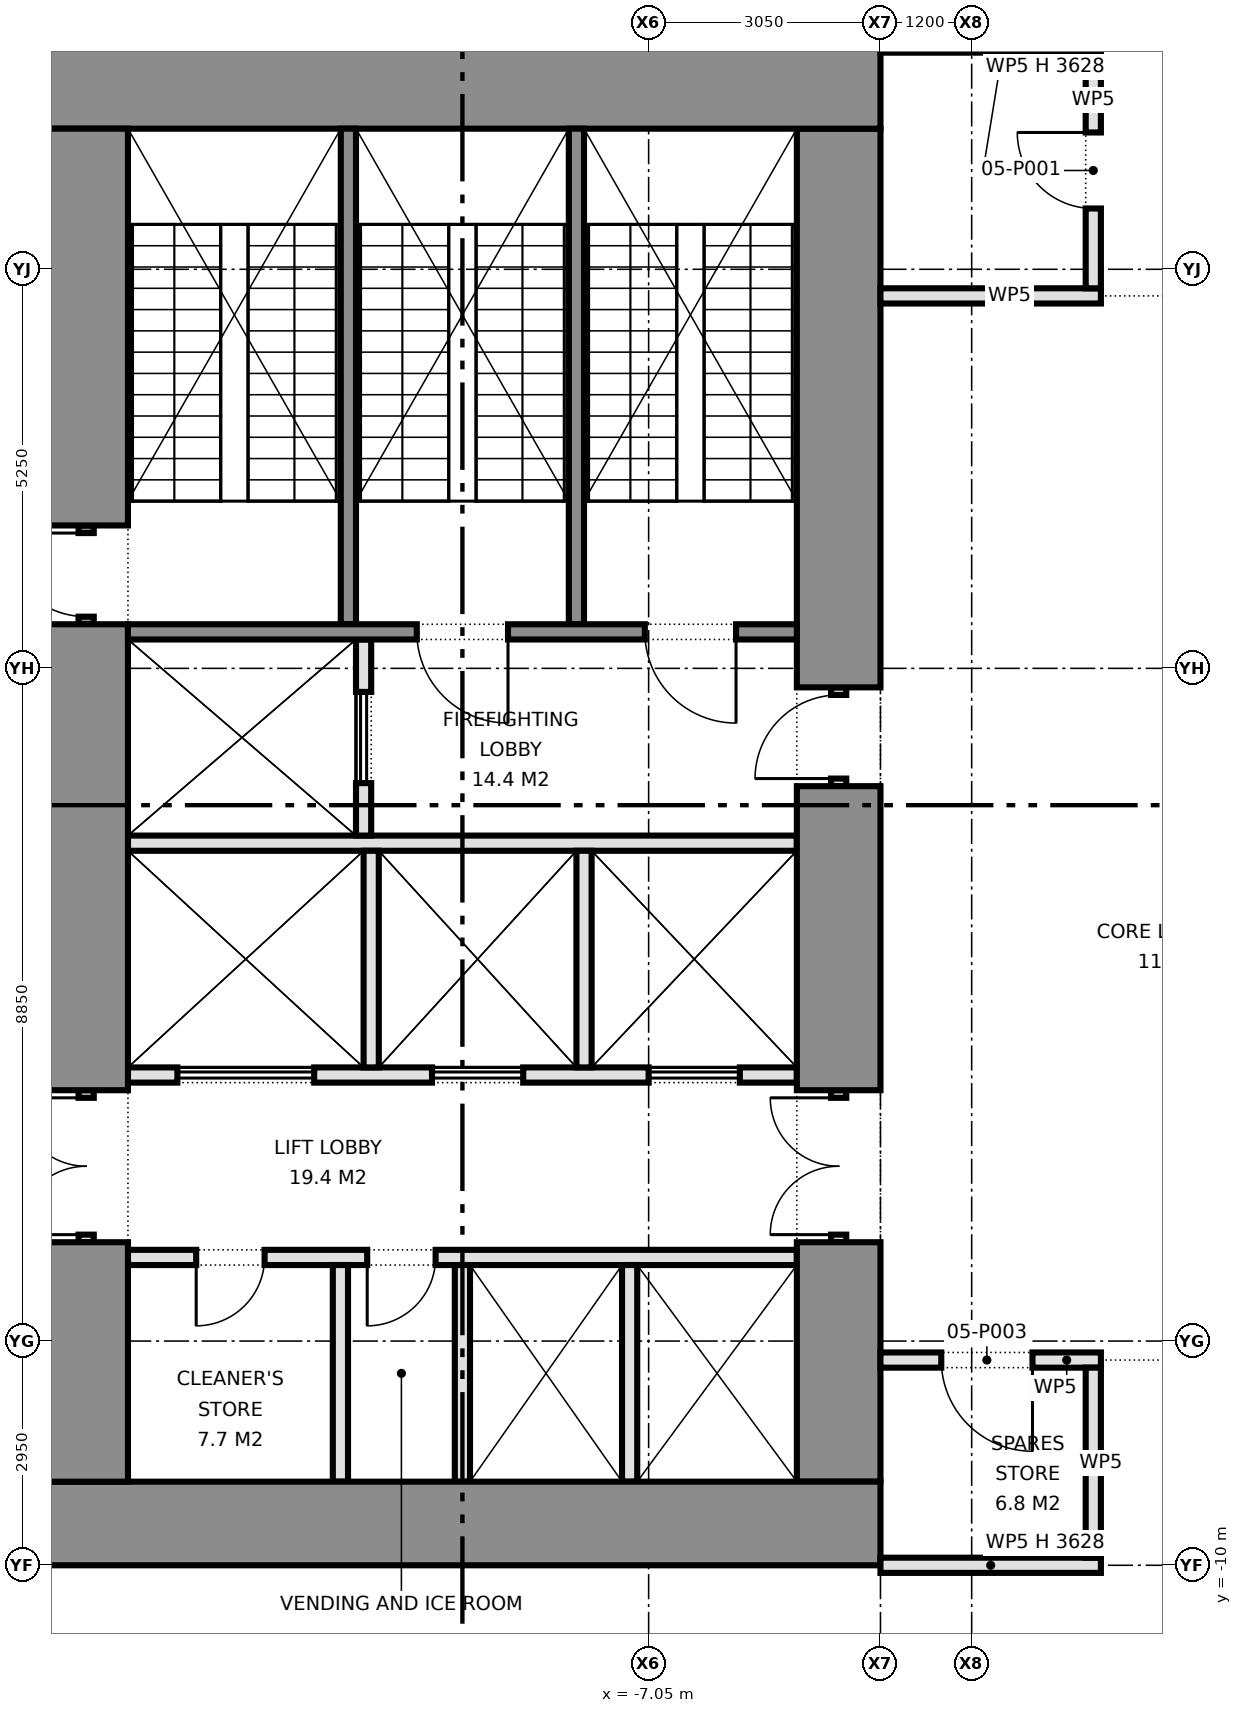
"""IFC4 building model, lengths in metres.
Left out: names, types, materials, properties, quantities, classifications, styles, units other than length and angle.
Written with IfcOpenShell. Run it as: python <this file> out.ifc"""

import sys

from ifc_helpers import new_model, si_unit, direction, frame, frame_2d, origin, place, context, subcontext, project, spatial, rectangle, extrude, element, fill, save


model = new_model("IFC4")
c1 = context("Model", 3, precision=1e-05, world=origin(), true_north=direction((0.0, 1.0)))
c2 = subcontext(c1, "Body", "Model", "MODEL_VIEW")
j1 = project(units=[si_unit("LENGTHUNIT", "METRE"), si_unit("PLANEANGLEUNIT", "RADIAN")], contexts=[c1])
p1 = place(None, origin())
s1 = spatial("IfcSite", under=j1, at=p1, CompositionType="ELEMENT")
p2 = place(p1, origin())
s2 = spatial("IfcBuilding", under=s1, at=p2, CompositionType="ELEMENT")
p3 = place(p2, frame((0.0, 0.0, 20.9)))
s3 = spatial("IfcBuildingStorey", under=s2, at=p3, CompositionType="ELEMENT", Elevation=20.9)
for number, where, z_axis, x_axis in (
    (1, (-15.0, -9.45, 0.0), (0.0, 0.0, 1.0), (1.0, 0.0, 0.0)),
    (2, (-15.0, 9.45, 0.0), (0.0, 0.0, 1.0), (1.0, 0.0, 0.0)),
):
    element("IfcWall", number, at=place(p3, frame(where, z_axis=z_axis, x_axis=x_axis)), inside=s3, PredefinedType="SHEAR", context=c2, shape_type="SweptSolid", body=[
        extrude(rectangle(XDim=11.0, YDim=1.1, at=frame_2d((5.5, 0.0))), origin(), (0.0, 0.0, 1.0), 4.575),
    ])
p4 = place(p3, frame((-14.45, -8.9, 0.0), z_axis=(0.0, 0.0, 1.0), x_axis=(0.0, 1.0, 0.0)))
e3 = element("IfcWall", 3, at=p4, inside=s3, PredefinedType="SHEAR", context=c2, shape_type="SweptSolid", body=[
    extrude(rectangle(XDim=3.15, YDim=1.1, at=frame_2d((1.575, 0.0))), origin(), (0.0, 0.0, 1.0), 4.575),
])
p5 = place(p3, frame((-14.45, -5.75, 0.0), z_axis=(0.0, 0.0, 1.0), x_axis=(0.0, 1.0, 0.0)))
e4 = element("IfcWall", 4, at=p5, inside=s3, PredefinedType="PARTITIONING", context=c2, shape_type="SweptSolid", body=[
    extrude(rectangle(XDim=2.0, YDim=0.2, at=frame_2d((1.0, 0.0))), origin(), (0.0, 0.0, 1.0), 2.4),
])
p6 = place(p5, frame((0.1, 0.0, 0.0)))
e5 = element("IfcOpeningElement", 5, at=p6, cuts=e4, PredefinedType="OPENING", context=c2, shape_type="SweptSolid", body=[
    extrude(rectangle(XDim=1.8, YDim=2.1, at=frame_2d((0.9, 1.05))), frame((0.0, 0.11, 0.0), z_axis=(0.0, -1.0, 0.0), x_axis=(1.0, 0.0, 0.0)), (0.0, 0.0, 1.0), 0.22),
])
p7 = place(p3, frame((-14.45, -3.75, 0.0), z_axis=(0.0, 0.0, 1.0), x_axis=(0.0, 1.0, 0.0)))
e6 = element("IfcWall", 6, at=p7, inside=s3, PredefinedType="SHEAR", context=c2, shape_type="SweptSolid", body=[
    extrude(rectangle(XDim=6.13, YDim=1.1, at=frame_2d((3.065, 0.0))), origin(), (0.0, 0.0, 1.0), 4.575),
])
p8 = place(p3, frame((-14.45, 2.38, 0.0), z_axis=(0.0, 0.0, 1.0), x_axis=(0.0, 1.0, 0.0)))
e7 = element("IfcWall", 7, at=p8, inside=s3, PredefinedType="SHEAR", context=c2, shape_type="SweptSolid", body=[
    extrude(rectangle(XDim=1.3, YDim=0.2, at=frame_2d((0.65, 0.0))), origin(), (0.0, 0.0, 1.0), 2.4),
])
p9 = place(p8, frame((0.1, 0.0, 0.0)))
e8 = element("IfcOpeningElement", 8, at=p9, cuts=e7, PredefinedType="OPENING", context=c2, shape_type="SweptSolid", body=[
    extrude(rectangle(XDim=1.1, YDim=2.1, at=frame_2d((0.55, 1.05))), frame((0.0, 0.11, 0.0), z_axis=(0.0, -1.0, 0.0), x_axis=(1.0, 0.0, 0.0)), (0.0, 0.0, 1.0), 0.22),
])
p10 = place(p3, frame((-14.45, 3.68, 0.0), z_axis=(0.0, 0.0, 1.0), x_axis=(0.0, 1.0, 0.0)))
e9 = element("IfcWall", 9, at=p10, inside=s3, PredefinedType="SHEAR", context=c2, shape_type="SweptSolid", body=[
    extrude(rectangle(XDim=5.22, YDim=1.1, at=frame_2d((2.61, 0.0))), origin(), (0.0, 0.0, 1.0), 4.575),
])
p11 = place(p3, frame((-4.55, -8.9, 0.0), z_axis=(0.0, 0.0, 1.0), x_axis=(0.0, 1.0, 0.0)))
e10 = element("IfcWall", 10, at=p11, inside=s3, PredefinedType="SHEAR", context=c2, shape_type="SweptSolid", body=[
    extrude(rectangle(XDim=3.15, YDim=1.1, at=frame_2d((1.575, 0.0))), origin(), (0.0, 0.0, 1.0), 4.575),
])
p12 = place(p3, frame((-4.55, -5.75, 0.0), z_axis=(0.0, 0.0, 1.0), x_axis=(0.0, 1.0, 0.0)))
e11 = element("IfcWall", 11, at=p12, inside=s3, PredefinedType="PARTITIONING", context=c2, shape_type="SweptSolid", body=[
    extrude(rectangle(XDim=2.0, YDim=0.2, at=frame_2d((1.0, 0.0))), origin(), (0.0, 0.0, 1.0), 2.4),
])
p13 = place(p12, frame((0.1, 0.0, 0.0)))
e12 = element("IfcOpeningElement", 12, at=p13, cuts=e11, PredefinedType="OPENING", context=c2, shape_type="SweptSolid", body=[
    extrude(rectangle(XDim=1.8, YDim=2.1, at=frame_2d((0.9, 1.05))), frame((0.0, 0.11, 0.0), z_axis=(0.0, -1.0, 0.0), x_axis=(1.0, 0.0, 0.0)), (0.0, 0.0, 1.0), 0.22),
])
p14 = place(p3, frame((-4.55, -3.75, 0.0), z_axis=(0.0, 0.0, 1.0), x_axis=(0.0, 1.0, 0.0)))
e13 = element("IfcWall", 13, at=p14, inside=s3, PredefinedType="SHEAR", context=c2, shape_type="SweptSolid", body=[
    extrude(rectangle(XDim=4.0, YDim=1.1, at=frame_2d((2.0, 0.0))), origin(), (0.0, 0.0, 1.0), 4.575),
])
p15 = place(p3, frame((-4.55, 0.25, 0.0), z_axis=(0.0, 0.0, 1.0), x_axis=(0.0, 1.0, 0.0)))
e14 = element("IfcWall", 14, at=p15, inside=s3, PredefinedType="PARTITIONING", context=c2, shape_type="SweptSolid", body=[
    extrude(rectangle(XDim=1.3, YDim=0.2, at=frame_2d((0.65, 0.0))), origin(), (0.0, 0.0, 1.0), 2.4),
])
p16 = place(p15, frame((0.1, 0.0, 0.0)))
e15 = element("IfcOpeningElement", 15, at=p16, cuts=e14, PredefinedType="OPENING", context=c2, shape_type="SweptSolid", body=[
    extrude(rectangle(XDim=1.1, YDim=2.1, at=frame_2d((0.55, 1.05))), frame((0.0, 0.11, 0.0), z_axis=(0.0, -1.0, 0.0), x_axis=(1.0, 0.0, 0.0)), (0.0, 0.0, 1.0), 0.22),
])
p17 = place(p3, frame((-4.55, 1.55, 0.0), z_axis=(0.0, 0.0, 1.0), x_axis=(0.0, 1.0, 0.0)))
e16 = element("IfcWall", 16, at=p17, inside=s3, PredefinedType="SHEAR", context=c2, shape_type="SweptSolid", body=[
    extrude(rectangle(XDim=7.35, YDim=1.1, at=frame_2d((3.675, 0.0))), origin(), (0.0, 0.0, 1.0), 4.575),
])
p18 = place(p3, frame((-13.9, -5.95, 0.0), z_axis=(0.0, 0.0, 1.0), x_axis=(1.0, 0.0, 0.0)))
e17 = element("IfcWall", 17, at=p18, inside=s3, PredefinedType="PARTITIONING", context=c2, shape_type="SweptSolid", body=[
    extrude(rectangle(XDim=8.8, YDim=0.2, at=frame_2d((4.4, 0.0))), origin(), (0.0, 0.0, 1.0), 4.575),
])
p19 = place(p18, frame((0.897, 0.0, 0.0)))
e18 = element("IfcOpeningElement", 18, at=p19, cuts=e17, PredefinedType="OPENING", context=c2, shape_type="SweptSolid", body=[
    extrude(rectangle(XDim=0.9, YDim=2.1, at=frame_2d((0.45, 1.05))), frame((0.0, 0.11, 0.0), z_axis=(0.0, -1.0, 0.0), x_axis=(1.0, 0.0, 0.0)), (0.0, 0.0, 1.0), 0.22),
])
p20 = place(p18, frame((3.147, 0.0, 0.0)))
e19 = element("IfcOpeningElement", 19, at=p20, cuts=e17, PredefinedType="OPENING", context=c2, shape_type="SweptSolid", body=[
    extrude(rectangle(XDim=0.9, YDim=2.1, at=frame_2d((0.45, 1.05))), frame((0.0, 0.11, 0.0), z_axis=(0.0, -1.0, 0.0), x_axis=(1.0, 0.0, 0.0)), (0.0, 0.0, 1.0), 0.22),
])
p21 = place(p3, frame((-13.9, -3.55, 0.0), z_axis=(0.0, 0.0, 1.0), x_axis=(1.0, 0.0, 0.0)))
e20 = element("IfcWall", 20, at=p21, inside=s3, PredefinedType="PARTITIONING", context=c2, shape_type="SweptSolid", body=[
    extrude(rectangle(XDim=8.8, YDim=0.2, at=frame_2d((4.4, 0.0))), origin(), (0.0, 0.0, 1.0), 4.575),
])
p22 = place(p21, frame((0.65, 0.0, 0.0)))
e21 = element("IfcOpeningElement", 21, at=p22, cuts=e20, PredefinedType="OPENING", context=c2, shape_type="SweptSolid", body=[
    extrude(rectangle(XDim=1.8, YDim=2.1, at=frame_2d((0.9, 1.05))), frame((0.0, 0.11, 0.0), z_axis=(0.0, -1.0, 0.0), x_axis=(1.0, 0.0, 0.0)), (0.0, 0.0, 1.0), 0.22),
])
p23 = place(p21, frame((4.0, 0.0, 0.0)))
e22 = element("IfcOpeningElement", 22, at=p23, cuts=e20, PredefinedType="OPENING", context=c2, shape_type="SweptSolid", body=[
    extrude(rectangle(XDim=1.2, YDim=2.1, at=frame_2d((0.6, 1.05))), frame((0.0, 0.11, 0.0), z_axis=(0.0, -1.0, 0.0), x_axis=(1.0, 0.0, 0.0)), (0.0, 0.0, 1.0), 0.22),
])
p24 = place(p21, frame((6.85, 0.0, 0.0)))
e23 = element("IfcOpeningElement", 23, at=p24, cuts=e20, PredefinedType="OPENING", context=c2, shape_type="SweptSolid", body=[
    extrude(rectangle(XDim=1.2, YDim=2.1, at=frame_2d((0.6, 1.05))), frame((0.0, 0.11, 0.0), z_axis=(0.0, -1.0, 0.0), x_axis=(1.0, 0.0, 0.0)), (0.0, 0.0, 1.0), 0.22),
])
p25 = place(p3, frame((-13.9, -0.5, 0.0), z_axis=(0.0, 0.0, 1.0), x_axis=(1.0, 0.0, 0.0)))
e24 = element("IfcWall", 24, at=p25, inside=s3, PredefinedType="PARTITIONING", context=c2, shape_type="SweptSolid", body=[
    extrude(rectangle(XDim=8.8, YDim=0.2, at=frame_2d((4.4, 0.0))), origin(), (0.0, 0.0, 1.0), 4.575),
])
p26 = place(p3, frame((-10.8, -0.4, 0.0), z_axis=(0.0, 0.0, 1.0), x_axis=(0.0, 1.0, 0.0)))
e25 = element("IfcWall", 25, at=p26, inside=s3, PredefinedType="PARTITIONING", context=c2, shape_type="SweptSolid", body=[
    extrude(rectangle(XDim=2.58, YDim=0.2, at=frame_2d((1.29, 0.0))), origin(), (0.0, 0.0, 1.0), 4.575),
])
p27 = place(p26, frame((0.69, 0.0, 0.0)))
e26 = element("IfcOpeningElement", 26, at=p27, cuts=e25, PredefinedType="OPENING", context=c2, shape_type="SweptSolid", body=[
    extrude(rectangle(XDim=1.2, YDim=2.1, at=frame_2d((0.6, 1.05))), frame((0.0, 0.11, 0.0), z_axis=(0.0, -1.0, 0.0), x_axis=(1.0, 0.0, 0.0)), (0.0, 0.0, 1.0), 0.22),
])
p28 = place(p3, frame((-13.9, 2.28, 0.0), z_axis=(0.0, 0.0, 1.0), x_axis=(1.0, 0.0, 0.0)))
e27 = element("IfcWall", 27, at=p28, inside=s3, PredefinedType="SHEAR", context=c2, shape_type="SweptSolid", body=[
    extrude(rectangle(XDim=8.8, YDim=0.2, at=frame_2d((4.4, 0.0))), origin(), (0.0, 0.0, 1.0), 4.575),
])
p29 = place(p28, frame((3.8, 0.0, 0.0)))
e28 = element("IfcOpeningElement", 28, at=p29, cuts=e27, PredefinedType="OPENING", context=c2, shape_type="SweptSolid", body=[
    extrude(rectangle(XDim=1.2, YDim=2.1, at=frame_2d((0.6, 1.05))), frame((0.0, 0.11, 0.0), z_axis=(0.0, -1.0, 0.0), x_axis=(1.0, 0.0, 0.0)), (0.0, 0.0, 1.0), 0.22),
])
p30 = place(p28, frame((6.8, 0.0, 0.0)))
e29 = element("IfcOpeningElement", 29, at=p30, cuts=e27, PredefinedType="OPENING", context=c2, shape_type="SweptSolid", body=[
    extrude(rectangle(XDim=1.2, YDim=2.1, at=frame_2d((0.6, 1.05))), frame((0.0, 0.11, 0.0), z_axis=(0.0, -1.0, 0.0), x_axis=(1.0, 0.0, 0.0)), (0.0, 0.0, 1.0), 0.22),
])
for number, where, z_axis, x_axis in (
    (30, (-11.0, 2.38, 0.0), (0.0, 0.0, 1.0), (0.0, 1.0, 0.0)),
    (31, (-8.0, 2.38, 0.0), (0.0, 0.0, 1.0), (0.0, 1.0, 0.0)),
):
    element("IfcWall", number, at=place(p3, frame(where, z_axis=z_axis, x_axis=x_axis)), inside=s3, PredefinedType="SHEAR", context=c2, shape_type="SweptSolid", body=[
        extrude(rectangle(XDim=6.52, YDim=0.2, at=frame_2d((3.26, 0.0))), origin(), (0.0, 0.0, 1.0), 4.575),
    ])
for number, where, z_axis, x_axis in (
    (32, (-9.5, -8.9, 0.0), (0.0, 0.0, 1.0), (0.0, 1.0, 0.0)),
    (33, (-7.3, -8.9, 0.0), (0.0, 0.0, 1.0), (0.0, 1.0, 0.0)),
    (34, (-11.105, -8.9, 0.0), (0.0, 0.0, 1.0), (0.0, 1.0, 0.0)),
    (35, (-10.7, -3.45, 0.0), (0.0, 0.0, 1.0), (0.0, 1.0, 0.0)),
    (36, (-7.9, -3.45, 0.0), (0.0, 0.0, 1.0), (0.0, 1.0, 0.0)),
):
    element("IfcWall", number, at=place(p3, frame(where, z_axis=z_axis, x_axis=x_axis)), inside=s3, PredefinedType="PARTITIONING", context=c2, shape_type="SweptSolid", body=[
        extrude(rectangle(XDim=2.85, YDim=0.2, at=frame_2d((1.425, 0.0))), origin(), (0.0, 0.0, 1.0), 4.575),
    ])
p31 = place(p3, frame((-4.0, -10.0, 0.0), z_axis=(0.0, 0.0, 1.0), x_axis=(1.0, 0.0, 0.0)))
e37 = element("IfcWall", 37, at=p31, inside=s3, PredefinedType="PARTITIONING", context=c2, shape_type="SweptSolid", body=[
    extrude(rectangle(XDim=2.9, YDim=0.2, at=frame_2d((1.45, 0.0))), origin(), (0.0, 0.0, 1.0), 3.628),
])
p32 = place(p3, frame((-4.0, -7.3, 0.0), z_axis=(0.0, 0.0, 1.0), x_axis=(1.0, 0.0, 0.0)))
e38 = element("IfcWall", 38, at=p32, inside=s3, PredefinedType="PARTITIONING", context=c2, shape_type="SweptSolid", body=[
    extrude(rectangle(XDim=2.9, YDim=0.2, at=frame_2d((1.45, 0.0))), origin(), (0.0, 0.0, 1.0), 4.575),
])
p33 = place(p32, frame((0.8, 0.0, 0.0)))
e39 = element("IfcOpeningElement", 39, at=p33, cuts=e38, PredefinedType="OPENING", context=c2, shape_type="SweptSolid", body=[
    extrude(rectangle(XDim=1.2, YDim=2.1, at=frame_2d((0.6, 1.05))), frame((0.0, 0.11, 0.0), z_axis=(0.0, -1.0, 0.0), x_axis=(1.0, 0.0, 0.0)), (0.0, 0.0, 1.0), 0.22),
])
p34 = place(p3, frame((-4.0, 6.7, 0.0), z_axis=(0.0, 0.0, 1.0), x_axis=(1.0, 0.0, 0.0)))
e40 = element("IfcWall", 40, at=p34, inside=s3, PredefinedType="PARTITIONING", context=c2, shape_type="SweptSolid", body=[
    extrude(rectangle(XDim=2.9, YDim=0.2, at=frame_2d((1.45, 0.0))), origin(), (0.0, 0.0, 1.0), 4.575),
])
p35 = place(p3, frame((-1.2, -9.9, 0.0), z_axis=(0.0, 0.0, 1.0), x_axis=(0.0, 1.0, 0.0)))
e41 = element("IfcWall", 41, at=p35, inside=s3, PredefinedType="PARTITIONING", context=c2, shape_type="SweptSolid", body=[
    extrude(rectangle(XDim=2.5, YDim=0.2, at=frame_2d((1.25, 0.0))), origin(), (0.0, 0.0, 1.0), 4.575),
])
p36 = place(p3, frame((-1.2, 6.8, 0.0), z_axis=(0.0, 0.0, 1.0), x_axis=(0.0, 1.0, 0.0)))
e42 = element("IfcWall", 42, at=p36, inside=s3, PredefinedType="PARTITIONING", context=c2, shape_type="SweptSolid", body=[
    extrude(rectangle(XDim=3.1, YDim=0.2, at=frame_2d((1.55, 0.0))), origin(), (0.0, 0.0, 1.0), 4.575),
])
p37 = place(p36, frame((1.05, 0.0, 0.0)))
e43 = element("IfcOpeningElement", 43, at=p37, cuts=e42, PredefinedType="OPENING", context=c2, shape_type="SweptSolid", body=[
    extrude(rectangle(XDim=1.0, YDim=2.1, at=frame_2d((0.5, 1.05))), frame((0.0, 0.11, 0.0), z_axis=(0.0, -1.0, 0.0), x_axis=(1.0, 0.0, 0.0)), (0.0, 0.0, 1.0), 0.22),
])
p38 = place(p6, origin())
e44 = element("IfcDoor", 44, at=p38, inside=s3, OperationType="DOUBLE_DOOR_SINGLE_SWING", PredefinedType="DOOR", context=c2, shape_type="SweptSolid", body=[
    extrude(rectangle(XDim=1.8, YDim=2.1, at=frame_2d((0.9, 1.05))), frame((0.0, 0.025, 0.0), z_axis=(0.0, -1.0, 0.0), x_axis=(1.0, 0.0, 0.0)), (0.0, 0.0, 1.0), 0.05),
])
fill(e5, e44)
p39 = place(p9, origin())
e45 = element("IfcDoor", 45, at=p39, inside=s3, OperationType="SINGLE_SWING_RIGHT", PredefinedType="DOOR", context=c2, shape_type="SweptSolid", body=[
    extrude(rectangle(XDim=1.1, YDim=2.1, at=frame_2d((0.55, 1.05))), frame((0.0, 0.025, 0.0), z_axis=(0.0, -1.0, 0.0), x_axis=(1.0, 0.0, 0.0)), (0.0, 0.0, 1.0), 0.05),
])
fill(e8, e45)
p40 = place(p13, origin())
e46 = element("IfcDoor", 46, at=p40, inside=s3, OperationType="DOUBLE_DOOR_SINGLE_SWING", PredefinedType="DOOR", context=c2, shape_type="SweptSolid", body=[
    extrude(rectangle(XDim=1.8, YDim=2.1, at=frame_2d((0.9, 1.05))), frame((0.0, 0.025, 0.0), z_axis=(0.0, -1.0, 0.0), x_axis=(1.0, 0.0, 0.0)), (0.0, 0.0, 1.0), 0.05),
])
fill(e12, e46)
p41 = place(p16, origin())
e47 = element("IfcDoor", 47, at=p41, inside=s3, OperationType="SINGLE_SWING_LEFT", PredefinedType="DOOR", context=c2, shape_type="SweptSolid", body=[
    extrude(rectangle(XDim=1.1, YDim=2.1, at=frame_2d((0.55, 1.05))), frame((0.0, 0.025, 0.0), z_axis=(0.0, -1.0, 0.0), x_axis=(1.0, 0.0, 0.0)), (0.0, 0.0, 1.0), 0.05),
])
fill(e15, e47)
p42 = place(p22, origin())
e48 = element("IfcDoor", 48, at=p42, inside=s3, OperationType="DOUBLE_DOOR_SLIDING", PredefinedType="DOOR", context=c2, shape_type="SweptSolid", body=[
    extrude(rectangle(XDim=1.8, YDim=2.1, at=frame_2d((0.9, 1.05))), frame((0.0, 0.025, 0.0), z_axis=(0.0, -1.0, 0.0), x_axis=(1.0, 0.0, 0.0)), (0.0, 0.0, 1.0), 0.05),
])
fill(e21, e48)
p43 = place(p23, origin())
e49 = element("IfcDoor", 49, at=p43, inside=s3, OperationType="DOUBLE_DOOR_SLIDING", PredefinedType="DOOR", context=c2, shape_type="SweptSolid", body=[
    extrude(rectangle(XDim=1.2, YDim=2.1, at=frame_2d((0.6, 1.05))), frame((0.0, 0.025, 0.0), z_axis=(0.0, -1.0, 0.0), x_axis=(1.0, 0.0, 0.0)), (0.0, 0.0, 1.0), 0.05),
])
fill(e22, e49)
p44 = place(p24, origin())
e50 = element("IfcDoor", 50, at=p44, inside=s3, OperationType="DOUBLE_DOOR_SLIDING", PredefinedType="DOOR", context=c2, shape_type="SweptSolid", body=[
    extrude(rectangle(XDim=1.2, YDim=2.1, at=frame_2d((0.6, 1.05))), frame((0.0, 0.025, 0.0), z_axis=(0.0, -1.0, 0.0), x_axis=(1.0, 0.0, 0.0)), (0.0, 0.0, 1.0), 0.05),
])
fill(e23, e50)
p45 = place(p27, origin())
e51 = element("IfcDoor", 51, at=p45, inside=s3, OperationType="DOUBLE_DOOR_SLIDING", PredefinedType="DOOR", context=c2, shape_type="SweptSolid", body=[
    extrude(rectangle(XDim=1.2, YDim=2.1, at=frame_2d((0.6, 1.05))), frame((0.0, 0.025, 0.0), z_axis=(0.0, -1.0, 0.0), x_axis=(1.0, 0.0, 0.0)), (0.0, 0.0, 1.0), 0.05),
])
fill(e26, e51)
p46 = place(p19, frame((0.9, 0.0, 0.0), z_axis=(0.0, 0.0, 1.0), x_axis=(-1.0, 0.0, 0.0)))
e52 = element("IfcDoor", 52, at=p46, inside=s3, OperationType="SINGLE_SWING_RIGHT", PredefinedType="DOOR", context=c2, shape_type="SweptSolid", body=[
    extrude(rectangle(XDim=0.9, YDim=2.1, at=frame_2d((0.45, 1.05))), frame((0.0, 0.025, 0.0), z_axis=(0.0, -1.0, 0.0), x_axis=(1.0, 0.0, 0.0)), (0.0, 0.0, 1.0), 0.05),
])
fill(e18, e52)
p47 = place(p20, frame((0.9, 0.0, 0.0), z_axis=(0.0, 0.0, 1.0), x_axis=(-1.0, 0.0, 0.0)))
e53 = element("IfcDoor", 53, at=p47, inside=s3, OperationType="SINGLE_SWING_RIGHT", PredefinedType="DOOR", context=c2, shape_type="SweptSolid", body=[
    extrude(rectangle(XDim=0.9, YDim=2.1, at=frame_2d((0.45, 1.05))), frame((0.0, 0.025, 0.0), z_axis=(0.0, -1.0, 0.0), x_axis=(1.0, 0.0, 0.0)), (0.0, 0.0, 1.0), 0.05),
])
fill(e19, e53)
p48 = place(p29, frame((1.2, 0.0, 0.0), z_axis=(0.0, 0.0, 1.0), x_axis=(-1.0, 0.0, 0.0)))
e54 = element("IfcDoor", 54, at=p48, inside=s3, OperationType="SINGLE_SWING_LEFT", PredefinedType="DOOR", context=c2, shape_type="SweptSolid", body=[
    extrude(rectangle(XDim=1.2, YDim=2.1, at=frame_2d((0.6, 1.05))), frame((0.0, 0.025, 0.0), z_axis=(0.0, -1.0, 0.0), x_axis=(1.0, 0.0, 0.0)), (0.0, 0.0, 1.0), 0.05),
])
fill(e28, e54)
p49 = place(p30, frame((1.2, 0.0, 0.0), z_axis=(0.0, 0.0, 1.0), x_axis=(-1.0, 0.0, 0.0)))
e55 = element("IfcDoor", 55, at=p49, inside=s3, OperationType="SINGLE_SWING_LEFT", PredefinedType="DOOR", context=c2, shape_type="SweptSolid", body=[
    extrude(rectangle(XDim=1.2, YDim=2.1, at=frame_2d((0.6, 1.05))), frame((0.0, 0.025, 0.0), z_axis=(0.0, -1.0, 0.0), x_axis=(1.0, 0.0, 0.0)), (0.0, 0.0, 1.0), 0.05),
])
fill(e29, e55)
p50 = place(p37, origin())
e56 = element("IfcDoor", 56, at=p50, inside=s3, OperationType="SINGLE_SWING_RIGHT", PredefinedType="DOOR", context=c2, shape_type="SweptSolid", body=[
    extrude(rectangle(XDim=1.0, YDim=2.1, at=frame_2d((0.5, 1.05))), frame((0.0, 0.025, 0.0), z_axis=(0.0, -1.0, 0.0), x_axis=(1.0, 0.0, 0.0)), (0.0, 0.0, 1.0), 0.05),
])
fill(e43, e56)
p51 = place(p33, frame((1.2, 0.0, 0.0), z_axis=(0.0, 0.0, 1.0), x_axis=(-1.0, 0.0, 0.0)))
e57 = element("IfcDoor", 57, at=p51, inside=s3, OperationType="SINGLE_SWING_LEFT", PredefinedType="DOOR", context=c2, shape_type="SweptSolid", body=[
    extrude(rectangle(XDim=1.2, YDim=2.1, at=frame_2d((0.6, 1.05))), frame((0.0, 0.025, 0.0), z_axis=(0.0, -1.0, 0.0), x_axis=(1.0, 0.0, 0.0)), (0.0, 0.0, 1.0), 0.05),
])
fill(e39, e57)
save(model, sys.argv[1])
